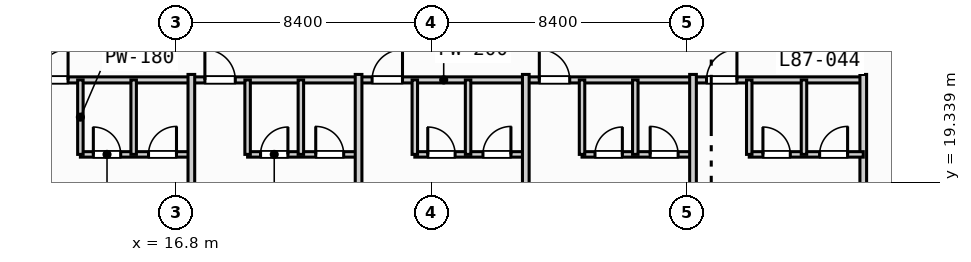
"""IFC4 building model, lengths in metres.
Left out: names, types, materials, properties, quantities, classifications, styles, units other than length and angle.
Written with IfcOpenShell. Run it as: python <this file> out.ifc"""

import sys

from ifc_helpers import new_model, si_unit, direction, frame, frame_2d, origin, place, context, subcontext, project, spatial, rectangle, extrude, element, fill, save


model = new_model("IFC4")
c1 = context("Model", 3, precision=1e-05, world=origin(), true_north=direction((0.0, 1.0)))
c2 = subcontext(c1, "Body", "Model", "MODEL_VIEW")
j1 = project(units=[si_unit("LENGTHUNIT", "METRE"), si_unit("PLANEANGLEUNIT", "RADIAN")], contexts=[c1])
p1 = place(None, origin())
s1 = spatial("IfcSite", under=j1, at=p1, CompositionType="ELEMENT")
p2 = place(p1, origin())
s2 = spatial("IfcBuilding", under=s1, at=p2, CompositionType="ELEMENT")
p3 = place(p2, frame((0.0, 0.0, 351.5)))
s3 = spatial("IfcBuildingStorey", under=s2, at=p3, CompositionType="ELEMENT", Elevation=351.5)
p4 = place(p3, frame((11.8, 22.7, 0.0), z_axis=(0.0, 0.0, 1.0), x_axis=(1.0, 0.0, 0.0)))
e1 = element("IfcWall", 1, at=p4, inside=s3, PredefinedType="PARTITIONING", context=c2, shape_type="SweptSolid", body=[
    extrude(rectangle(XDim=27.6, YDim=0.2, at=frame_2d((13.8, 0.0))), origin(), (0.0, 0.0, 1.0), 3.67),
])
p5 = place(p4, frame((0.445, 0.0, 0.0)))
e2 = element("IfcOpeningElement", 2, at=p5, cuts=e1, PredefinedType="OPENING", context=c2, shape_type="SweptSolid", body=[
    extrude(rectangle(XDim=1.0, YDim=2.15, at=frame_2d((0.5, 1.075))), frame((0.0, 0.11, 0.0), z_axis=(0.0, -1.0, 0.0), x_axis=(1.0, 0.0, 0.0)), (0.0, 0.0, 1.0), 0.22),
])
p6 = place(p4, frame((5.945, 0.0, 0.0)))
e3 = element("IfcOpeningElement", 3, at=p6, cuts=e1, PredefinedType="OPENING", context=c2, shape_type="SweptSolid", body=[
    extrude(rectangle(XDim=1.0, YDim=2.15, at=frame_2d((0.5, 1.075))), frame((0.0, 0.11, 0.0), z_axis=(0.0, -1.0, 0.0), x_axis=(1.0, 0.0, 0.0)), (0.0, 0.0, 1.0), 0.22),
])
p7 = place(p4, frame((11.445, 0.0, 0.0)))
e4 = element("IfcOpeningElement", 4, at=p7, cuts=e1, PredefinedType="OPENING", context=c2, shape_type="SweptSolid", body=[
    extrude(rectangle(XDim=1.0, YDim=2.15, at=frame_2d((0.5, 1.075))), frame((0.0, 0.11, 0.0), z_axis=(0.0, -1.0, 0.0), x_axis=(1.0, 0.0, 0.0)), (0.0, 0.0, 1.0), 0.22),
])
p8 = place(p4, frame((16.945, 0.0, 0.0)))
e5 = element("IfcOpeningElement", 5, at=p8, cuts=e1, PredefinedType="OPENING", context=c2, shape_type="SweptSolid", body=[
    extrude(rectangle(XDim=1.0, YDim=2.15, at=frame_2d((0.5, 1.075))), frame((0.0, 0.11, 0.0), z_axis=(0.0, -1.0, 0.0), x_axis=(1.0, 0.0, 0.0)), (0.0, 0.0, 1.0), 0.22),
])
p9 = place(p4, frame((22.445, 0.0, 0.0)))
e6 = element("IfcOpeningElement", 6, at=p9, cuts=e1, PredefinedType="OPENING", context=c2, shape_type="SweptSolid", body=[
    extrude(rectangle(XDim=1.0, YDim=2.15, at=frame_2d((0.5, 1.075))), frame((0.0, 0.11, 0.0), z_axis=(0.0, -1.0, 0.0), x_axis=(1.0, 0.0, 0.0)), (0.0, 0.0, 1.0), 0.22),
])
p10 = place(p3, frame((13.65, 20.25, 0.0), z_axis=(0.0, 0.0, 1.0), x_axis=(1.0, 0.0, 0.0)))
e7 = element("IfcWall", 7, at=p10, inside=s3, PredefinedType="PLUMBINGWALL", context=c2, shape_type="SweptSolid", body=[
    extrude(rectangle(XDim=3.65, YDim=0.18, at=frame_2d((1.825, 0.0))), origin(), (0.0, 0.0, 1.0), 3.67),
])
p11 = place(p10, frame((0.426, 0.0, 0.0)))
e8 = element("IfcOpeningElement", 8, at=p11, cuts=e7, PredefinedType="OPENING", context=c2, shape_type="SweptSolid", body=[
    extrude(rectangle(XDim=0.9, YDim=2.1, at=frame_2d((0.45, 1.05))), frame((0.0, 0.1, 0.0), z_axis=(0.0, -1.0, 0.0), x_axis=(1.0, 0.0, 0.0)), (0.0, 0.0, 1.0), 0.2),
])
p12 = place(p10, frame((2.241, 0.0, 0.0)))
e9 = element("IfcOpeningElement", 9, at=p12, cuts=e7, PredefinedType="OPENING", context=c2, shape_type="SweptSolid", body=[
    extrude(rectangle(XDim=0.92, YDim=2.1, at=frame_2d((0.46, 1.05))), frame((0.0, 0.1, 0.0), z_axis=(0.0, -1.0, 0.0), x_axis=(1.0, 0.0, 0.0)), (0.0, 0.0, 1.0), 0.2),
])
for number, where, z_axis, x_axis in (
    (10, (13.65, 20.25, 0.0), (0.0, 0.0, 1.0), (0.0, 1.0, 0.0)),
    (11, (15.402, 20.25, 0.0), (0.0, 0.0, 1.0), (0.0, 1.0, 0.0)),
):
    element("IfcWall", number, at=place(p3, frame(where, z_axis=z_axis, x_axis=x_axis)), inside=s3, PredefinedType="PLUMBINGWALL", context=c2, shape_type="SweptSolid", body=[
        extrude(rectangle(XDim=2.45, YDim=0.18, at=frame_2d((1.225, 0.0))), origin(), (0.0, 0.0, 1.0), 3.67),
    ])
p13 = place(p3, frame((17.3, 8.6, 0.0), z_axis=(0.0, 0.0, 1.0), x_axis=(0.0, 1.0, 0.0)))
e12 = element("IfcWall", 12, at=p13, inside=s3, PredefinedType="PARTITIONING", context=c2, shape_type="SweptSolid", body=[
    extrude(rectangle(XDim=14.28, YDim=0.22, at=frame_2d((7.14, 0.0))), origin(), (0.0, 0.0, 1.0), 3.67),
])
p14 = place(p3, frame((19.15, 20.25, 0.0), z_axis=(0.0, 0.0, 1.0), x_axis=(1.0, 0.0, 0.0)))
e13 = element("IfcWall", 13, at=p14, inside=s3, PredefinedType="PLUMBINGWALL", context=c2, shape_type="SweptSolid", body=[
    extrude(rectangle(XDim=3.65, YDim=0.18, at=frame_2d((1.825, 0.0))), origin(), (0.0, 0.0, 1.0), 3.67),
])
p15 = place(p14, frame((0.426, 0.0, 0.0)))
e14 = element("IfcOpeningElement", 14, at=p15, cuts=e13, PredefinedType="OPENING", context=c2, shape_type="SweptSolid", body=[
    extrude(rectangle(XDim=0.9, YDim=2.1, at=frame_2d((0.45, 1.05))), frame((0.0, 0.1, 0.0), z_axis=(0.0, -1.0, 0.0), x_axis=(1.0, 0.0, 0.0)), (0.0, 0.0, 1.0), 0.2),
])
p16 = place(p14, frame((2.241, 0.0, 0.0)))
e15 = element("IfcOpeningElement", 15, at=p16, cuts=e13, PredefinedType="OPENING", context=c2, shape_type="SweptSolid", body=[
    extrude(rectangle(XDim=0.92, YDim=2.1, at=frame_2d((0.46, 1.05))), frame((0.0, 0.1, 0.0), z_axis=(0.0, -1.0, 0.0), x_axis=(1.0, 0.0, 0.0)), (0.0, 0.0, 1.0), 0.2),
])
p17 = place(p3, frame((19.15, 20.25, 0.0), z_axis=(0.0, 0.0, 1.0), x_axis=(0.0, 1.0, 0.0)))
e16 = element("IfcWall", 16, at=p17, inside=s3, PredefinedType="PLUMBINGWALL", context=c2, shape_type="SweptSolid", body=[
    extrude(rectangle(XDim=2.45, YDim=0.18, at=frame_2d((1.225, 0.0))), origin(), (0.0, 0.0, 1.0), 3.67),
])
p18 = place(p3, frame((20.902, 20.25, 0.0), z_axis=(0.0, 0.0, 1.0), x_axis=(0.0, 1.0, 0.0)))
e17 = element("IfcWall", 17, at=p18, inside=s3, PredefinedType="PLUMBINGWALL", context=c2, shape_type="SweptSolid", body=[
    extrude(rectangle(XDim=2.45, YDim=0.18, at=frame_2d((1.225, 0.0))), origin(), (0.0, 0.0, 1.0), 3.253),
])
p19 = place(p3, frame((22.8, 8.6, 0.0), z_axis=(0.0, 0.0, 1.0), x_axis=(0.0, 1.0, 0.0)))
e18 = element("IfcWall", 18, at=p19, inside=s3, PredefinedType="PARTITIONING", context=c2, shape_type="SweptSolid", body=[
    extrude(rectangle(XDim=14.28, YDim=0.22, at=frame_2d((7.14, 0.0))), origin(), (0.0, 0.0, 1.0), 3.67),
])
p20 = place(p3, frame((24.65, 20.25, 0.0), z_axis=(0.0, 0.0, 1.0), x_axis=(1.0, 0.0, 0.0)))
e19 = element("IfcWall", 19, at=p20, inside=s3, PredefinedType="PLUMBINGWALL", context=c2, shape_type="SweptSolid", body=[
    extrude(rectangle(XDim=3.65, YDim=0.18, at=frame_2d((1.825, 0.0))), origin(), (0.0, 0.0, 1.0), 3.67),
])
p21 = place(p20, frame((0.426, 0.0, 0.0)))
e20 = element("IfcOpeningElement", 20, at=p21, cuts=e19, PredefinedType="OPENING", context=c2, shape_type="SweptSolid", body=[
    extrude(rectangle(XDim=0.9, YDim=2.1, at=frame_2d((0.45, 1.05))), frame((0.0, 0.1, 0.0), z_axis=(0.0, -1.0, 0.0), x_axis=(1.0, 0.0, 0.0)), (0.0, 0.0, 1.0), 0.2),
])
p22 = place(p20, frame((2.241, 0.0, 0.0)))
e21 = element("IfcOpeningElement", 21, at=p22, cuts=e19, PredefinedType="OPENING", context=c2, shape_type="SweptSolid", body=[
    extrude(rectangle(XDim=0.92, YDim=2.1, at=frame_2d((0.46, 1.05))), frame((0.0, 0.1, 0.0), z_axis=(0.0, -1.0, 0.0), x_axis=(1.0, 0.0, 0.0)), (0.0, 0.0, 1.0), 0.2),
])
for number, where, z_axis, x_axis in (
    (22, (24.65, 20.25, 0.0), (0.0, 0.0, 1.0), (0.0, 1.0, 0.0)),
    (23, (26.402, 20.25, 0.0), (0.0, 0.0, 1.0), (0.0, 1.0, 0.0)),
):
    element("IfcWall", number, at=place(p3, frame(where, z_axis=z_axis, x_axis=x_axis)), inside=s3, PredefinedType="PLUMBINGWALL", context=c2, shape_type="SweptSolid", body=[
        extrude(rectangle(XDim=2.45, YDim=0.18, at=frame_2d((1.225, 0.0))), origin(), (0.0, 0.0, 1.0), 3.67),
    ])
p23 = place(p3, frame((28.3, 8.6, 0.0), z_axis=(0.0, 0.0, 1.0), x_axis=(0.0, 1.0, 0.0)))
e24 = element("IfcWall", 24, at=p23, inside=s3, PredefinedType="PARTITIONING", context=c2, shape_type="SweptSolid", body=[
    extrude(rectangle(XDim=14.28, YDim=0.22, at=frame_2d((7.14, 0.0))), origin(), (0.0, 0.0, 1.0), 3.67),
])
p24 = place(p3, frame((30.15, 20.25, 0.0), z_axis=(0.0, 0.0, 1.0), x_axis=(1.0, 0.0, 0.0)))
e25 = element("IfcWall", 25, at=p24, inside=s3, PredefinedType="PLUMBINGWALL", context=c2, shape_type="SweptSolid", body=[
    extrude(rectangle(XDim=3.65, YDim=0.18, at=frame_2d((1.825, 0.0))), origin(), (0.0, 0.0, 1.0), 3.67),
])
p25 = place(p24, frame((0.426, 0.0, 0.0)))
e26 = element("IfcOpeningElement", 26, at=p25, cuts=e25, PredefinedType="OPENING", context=c2, shape_type="SweptSolid", body=[
    extrude(rectangle(XDim=0.9, YDim=2.1, at=frame_2d((0.45, 1.05))), frame((0.0, 0.1, 0.0), z_axis=(0.0, -1.0, 0.0), x_axis=(1.0, 0.0, 0.0)), (0.0, 0.0, 1.0), 0.2),
])
p26 = place(p24, frame((2.241, 0.0, 0.0)))
e27 = element("IfcOpeningElement", 27, at=p26, cuts=e25, PredefinedType="OPENING", context=c2, shape_type="SweptSolid", body=[
    extrude(rectangle(XDim=0.92, YDim=2.1, at=frame_2d((0.46, 1.05))), frame((0.0, 0.1, 0.0), z_axis=(0.0, -1.0, 0.0), x_axis=(1.0, 0.0, 0.0)), (0.0, 0.0, 1.0), 0.2),
])
for number, where, z_axis, x_axis in (
    (28, (30.15, 20.25, 0.0), (0.0, 0.0, 1.0), (0.0, 1.0, 0.0)),
    (29, (31.902, 20.25, 0.0), (0.0, 0.0, 1.0), (0.0, 1.0, 0.0)),
):
    element("IfcWall", number, at=place(p3, frame(where, z_axis=z_axis, x_axis=x_axis)), inside=s3, PredefinedType="PLUMBINGWALL", context=c2, shape_type="SweptSolid", body=[
        extrude(rectangle(XDim=2.45, YDim=0.18, at=frame_2d((1.225, 0.0))), origin(), (0.0, 0.0, 1.0), 3.67),
    ])
p27 = place(p3, frame((33.8, 8.6, 0.0), z_axis=(0.0, 0.0, 1.0), x_axis=(0.0, 1.0, 0.0)))
e30 = element("IfcWall", 30, at=p27, inside=s3, PredefinedType="PARTITIONING", context=c2, shape_type="SweptSolid", body=[
    extrude(rectangle(XDim=14.28, YDim=0.22, at=frame_2d((7.14, 0.0))), origin(), (0.0, 0.0, 1.0), 3.07),
])
p28 = place(p3, frame((39.4, 8.6, 0.0), z_axis=(0.0, 0.0, 1.0), x_axis=(0.0, 1.0, 0.0)))
e31 = element("IfcWall", 31, at=p28, inside=s3, PredefinedType="PARTITIONING", context=c2, shape_type="SweptSolid", body=[
    extrude(rectangle(XDim=14.28, YDim=0.22, at=frame_2d((7.14, 0.0))), origin(), (0.0, 0.0, 1.0), 3.67),
])
p29 = place(p3, frame((35.65, 20.25, 0.0), z_axis=(0.0, 0.0, 1.0), x_axis=(1.0, 0.0, 0.0)))
e32 = element("IfcWall", 32, at=p29, inside=s3, PredefinedType="PLUMBINGWALL", context=c2, shape_type="SweptSolid", body=[
    extrude(rectangle(XDim=3.75, YDim=0.18, at=frame_2d((1.875, 0.0))), origin(), (0.0, 0.0, 1.0), 3.67),
])
p30 = place(p29, frame((0.45, 0.0, 0.0)))
e33 = element("IfcOpeningElement", 33, at=p30, cuts=e32, PredefinedType="OPENING", context=c2, shape_type="SweptSolid", body=[
    extrude(rectangle(XDim=0.9, YDim=2.1, at=frame_2d((0.45, 1.05))), frame((0.0, 0.1, 0.0), z_axis=(0.0, -1.0, 0.0), x_axis=(1.0, 0.0, 0.0)), (0.0, 0.0, 1.0), 0.2),
])
p31 = place(p29, frame((2.315, 0.0, 0.0)))
e34 = element("IfcOpeningElement", 34, at=p31, cuts=e32, PredefinedType="OPENING", context=c2, shape_type="SweptSolid", body=[
    extrude(rectangle(XDim=0.92, YDim=2.1, at=frame_2d((0.46, 1.05))), frame((0.0, 0.1, 0.0), z_axis=(0.0, -1.0, 0.0), x_axis=(1.0, 0.0, 0.0)), (0.0, 0.0, 1.0), 0.2),
])
for number, where, z_axis, x_axis in (
    (35, (35.65, 20.25, 0.0), (0.0, 0.0, 1.0), (0.0, 1.0, 0.0)),
    (36, (37.45, 20.25, 0.0), (0.0, 0.0, 1.0), (0.0, 1.0, 0.0)),
):
    element("IfcWall", number, at=place(p3, frame(where, z_axis=z_axis, x_axis=x_axis)), inside=s3, PredefinedType="PLUMBINGWALL", context=c2, shape_type="SweptSolid", body=[
        extrude(rectangle(XDim=2.45, YDim=0.18, at=frame_2d((1.225, 0.0))), origin(), (0.0, 0.0, 1.0), 3.67),
    ])
p32 = place(p5, origin())
e37 = element("IfcDoor", 37, at=p32, inside=s3, OperationType="SINGLE_SWING_RIGHT", PredefinedType="DOOR", context=c2, shape_type="SweptSolid", body=[
    extrude(rectangle(XDim=1.0, YDim=2.15, at=frame_2d((0.5, 1.075))), frame((0.0, 0.025, 0.0), z_axis=(0.0, -1.0, 0.0), x_axis=(1.0, 0.0, 0.0)), (0.0, 0.0, 1.0), 0.05),
])
fill(e2, e37)
p33 = place(p6, origin())
e38 = element("IfcDoor", 38, at=p33, inside=s3, OperationType="SINGLE_SWING_LEFT", PredefinedType="DOOR", context=c2, shape_type="SweptSolid", body=[
    extrude(rectangle(XDim=1.0, YDim=2.15, at=frame_2d((0.5, 1.075))), frame((0.0, 0.025, 0.0), z_axis=(0.0, -1.0, 0.0), x_axis=(1.0, 0.0, 0.0)), (0.0, 0.0, 1.0), 0.05),
])
fill(e3, e38)
p34 = place(p7, origin())
e39 = element("IfcDoor", 39, at=p34, inside=s3, OperationType="SINGLE_SWING_RIGHT", PredefinedType="DOOR", context=c2, shape_type="SweptSolid", body=[
    extrude(rectangle(XDim=1.0, YDim=2.15, at=frame_2d((0.5, 1.075))), frame((0.0, 0.025, 0.0), z_axis=(0.0, -1.0, 0.0), x_axis=(1.0, 0.0, 0.0)), (0.0, 0.0, 1.0), 0.05),
])
fill(e4, e39)
p35 = place(p8, origin())
e40 = element("IfcDoor", 40, at=p35, inside=s3, OperationType="SINGLE_SWING_LEFT", PredefinedType="DOOR", context=c2, shape_type="SweptSolid", body=[
    extrude(rectangle(XDim=1.0, YDim=2.15, at=frame_2d((0.5, 1.075))), frame((0.0, 0.025, 0.0), z_axis=(0.0, -1.0, 0.0), x_axis=(1.0, 0.0, 0.0)), (0.0, 0.0, 1.0), 0.05),
])
fill(e5, e40)
p36 = place(p9, origin())
e41 = element("IfcDoor", 41, at=p36, inside=s3, OperationType="SINGLE_SWING_RIGHT", PredefinedType="DOOR", context=c2, shape_type="SweptSolid", body=[
    extrude(rectangle(XDim=1.0, YDim=2.15, at=frame_2d((0.5, 1.075))), frame((0.0, 0.025, 0.0), z_axis=(0.0, -1.0, 0.0), x_axis=(1.0, 0.0, 0.0)), (0.0, 0.0, 1.0), 0.05),
])
fill(e6, e41)
p37 = place(p11, origin())
e42 = element("IfcDoor", 42, at=p37, inside=s3, OperationType="SINGLE_SWING_LEFT", PredefinedType="DOOR", context=c2, shape_type="SweptSolid", body=[
    extrude(rectangle(XDim=0.9, YDim=2.1, at=frame_2d((0.45, 1.05))), frame((0.0, 0.025, 0.0), z_axis=(0.0, -1.0, 0.0), x_axis=(1.0, 0.0, 0.0)), (0.0, 0.0, 1.0), 0.05),
])
fill(e8, e42)
p38 = place(p12, origin())
e43 = element("IfcDoor", 43, at=p38, inside=s3, OperationType="SINGLE_SWING_RIGHT", PredefinedType="DOOR", context=c2, shape_type="SweptSolid", body=[
    extrude(rectangle(XDim=0.92, YDim=2.1, at=frame_2d((0.46, 1.05))), frame((0.0, 0.025, 0.0), z_axis=(0.0, -1.0, 0.0), x_axis=(1.0, 0.0, 0.0)), (0.0, 0.0, 1.0), 0.05),
])
fill(e9, e43)
p39 = place(p15, origin())
e44 = element("IfcDoor", 44, at=p39, inside=s3, OperationType="SINGLE_SWING_RIGHT", PredefinedType="DOOR", context=c2, shape_type="SweptSolid", body=[
    extrude(rectangle(XDim=0.9, YDim=2.1, at=frame_2d((0.45, 1.05))), frame((0.0, 0.025, 0.0), z_axis=(0.0, -1.0, 0.0), x_axis=(1.0, 0.0, 0.0)), (0.0, 0.0, 1.0), 0.05),
])
fill(e14, e44)
p40 = place(p16, origin())
e45 = element("IfcDoor", 45, at=p40, inside=s3, OperationType="SINGLE_SWING_LEFT", PredefinedType="DOOR", context=c2, shape_type="SweptSolid", body=[
    extrude(rectangle(XDim=0.92, YDim=2.1, at=frame_2d((0.46, 1.05))), frame((0.0, 0.025, 0.0), z_axis=(0.0, -1.0, 0.0), x_axis=(1.0, 0.0, 0.0)), (0.0, 0.0, 1.0), 0.05),
])
fill(e15, e45)
p41 = place(p21, origin())
e46 = element("IfcDoor", 46, at=p41, inside=s3, OperationType="SINGLE_SWING_LEFT", PredefinedType="DOOR", context=c2, shape_type="SweptSolid", body=[
    extrude(rectangle(XDim=0.9, YDim=2.1, at=frame_2d((0.45, 1.05))), frame((0.0, 0.025, 0.0), z_axis=(0.0, -1.0, 0.0), x_axis=(1.0, 0.0, 0.0)), (0.0, 0.0, 1.0), 0.05),
])
fill(e20, e46)
p42 = place(p22, origin())
e47 = element("IfcDoor", 47, at=p42, inside=s3, OperationType="SINGLE_SWING_RIGHT", PredefinedType="DOOR", context=c2, shape_type="SweptSolid", body=[
    extrude(rectangle(XDim=0.92, YDim=2.1, at=frame_2d((0.46, 1.05))), frame((0.0, 0.025, 0.0), z_axis=(0.0, -1.0, 0.0), x_axis=(1.0, 0.0, 0.0)), (0.0, 0.0, 1.0), 0.05),
])
fill(e21, e47)
p43 = place(p25, origin())
e48 = element("IfcDoor", 48, at=p43, inside=s3, OperationType="SINGLE_SWING_RIGHT", PredefinedType="DOOR", context=c2, shape_type="SweptSolid", body=[
    extrude(rectangle(XDim=0.9, YDim=2.1, at=frame_2d((0.45, 1.05))), frame((0.0, 0.025, 0.0), z_axis=(0.0, -1.0, 0.0), x_axis=(1.0, 0.0, 0.0)), (0.0, 0.0, 1.0), 0.05),
])
fill(e26, e48)
p44 = place(p26, origin())
e49 = element("IfcDoor", 49, at=p44, inside=s3, OperationType="SINGLE_SWING_LEFT", PredefinedType="DOOR", context=c2, shape_type="SweptSolid", body=[
    extrude(rectangle(XDim=0.92, YDim=2.1, at=frame_2d((0.46, 1.05))), frame((0.0, 0.025, 0.0), z_axis=(0.0, -1.0, 0.0), x_axis=(1.0, 0.0, 0.0)), (0.0, 0.0, 1.0), 0.05),
])
fill(e27, e49)
p45 = place(p30, origin())
e50 = element("IfcDoor", 50, at=p45, inside=s3, OperationType="SINGLE_SWING_LEFT", PredefinedType="DOOR", context=c2, shape_type="SweptSolid", body=[
    extrude(rectangle(XDim=0.9, YDim=2.1, at=frame_2d((0.45, 1.05))), frame((0.0, 0.025, 0.0), z_axis=(0.0, -1.0, 0.0), x_axis=(1.0, 0.0, 0.0)), (0.0, 0.0, 1.0), 0.05),
])
fill(e33, e50)
p46 = place(p31, origin())
e51 = element("IfcDoor", 51, at=p46, inside=s3, OperationType="SINGLE_SWING_RIGHT", PredefinedType="DOOR", context=c2, shape_type="SweptSolid", body=[
    extrude(rectangle(XDim=0.92, YDim=2.1, at=frame_2d((0.46, 1.05))), frame((0.0, 0.025, 0.0), z_axis=(0.0, -1.0, 0.0), x_axis=(1.0, 0.0, 0.0)), (0.0, 0.0, 1.0), 0.05),
])
fill(e34, e51)
save(model, sys.argv[1])
